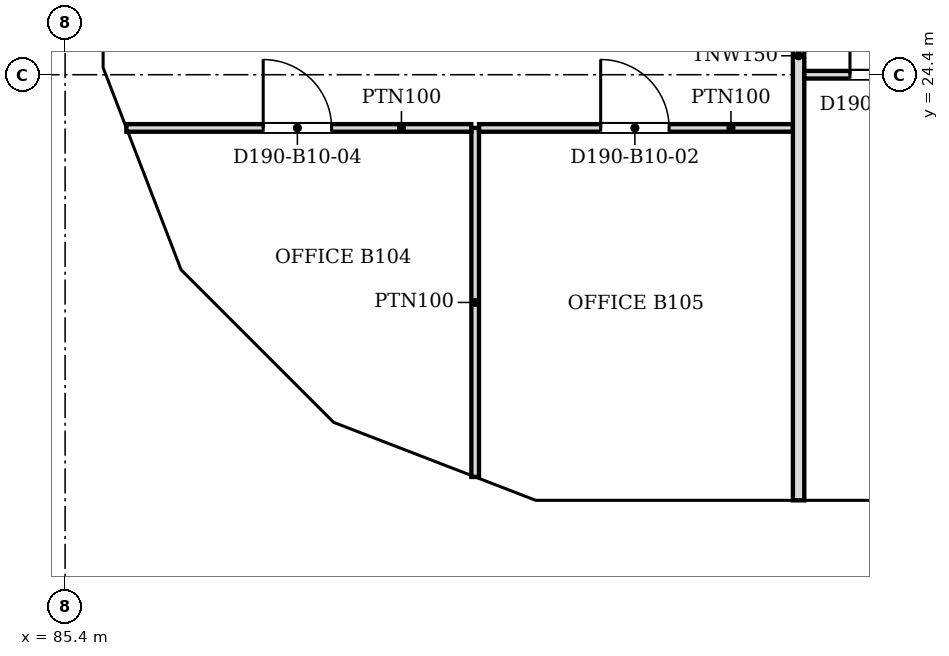
"""IFC4 building model, lengths in metres.
Left out: names, types, materials, properties, quantities, classifications, styles, units other than length and angle.
Written with IfcOpenShell. Run it as: python <this file> out.ifc"""

import sys

from ifc_helpers import new_model, si_unit, direction, frame, frame_2d, origin, place, context, subcontext, project, spatial, polyline, rectangle, outline, extrude, faceted_brep, source, transform, mapped, element, fill, save


model = new_model("IFC4")
c1 = context("Model", 3, precision=1e-05, world=origin(), true_north=direction((0.0, 1.0)))
c2 = subcontext(c1, "Body", "Model", "MODEL_VIEW")
j1 = project(units=[si_unit("LENGTHUNIT", "METRE"), si_unit("PLANEANGLEUNIT", "RADIAN")], contexts=[c1])
p1 = place(None, origin())
s1 = spatial("IfcSite", under=j1, at=p1, CompositionType="ELEMENT")
p2 = place(p1, origin())
s2 = spatial("IfcBuilding", under=s1, at=p2, CompositionType="ELEMENT")
p3 = place(p2, frame((0.0, 0.0, 102.8)))
s3 = spatial("IfcBuildingStorey", under=s2, at=p3, CompositionType="ELEMENT", Elevation=102.8)
m1 = source(origin(), c2, "Body", "Brep", [
    faceted_brep([(0.047, -0.25, 0.0), (3.05, -0.25, 3.8), (0.047, -0.25, 7.6), (0.0, -0.25, 7.54), (0.0, -0.25, 0.06), (0.093, 0.25, 7.541), (3.05, 0.25, 3.8), (0.093, 0.25, 0.059), (0.047, 0.0, 0.0), (0.047, 0.0, 7.6)], [[[0, 1, 2, 3, 4]], [[5, 6, 7]], [[7, 6, 1, 0, 8]], [[6, 5, 9, 2, 1]], [[3, 2, 9]], [[8, 0, 4]], [[7, 8, 4, 3, 9, 5]]]),
])
p4 = place(p3, frame((91.5, 18.55, -3.8), z_axis=(0.0, 0.0, 1.0), x_axis=(1.0, 0.0, 0.0)))
e1 = element("IfcWall", 1, at=p4, inside=s3, PredefinedType="SOLIDWALL", context=c2, shape_type="MappedRepresentation", body=[
    mapped(m1, transform((0.0, 0.0, 0.0), scale=1.0)),
])
m2 = source(origin(), c2, "Body", "SweptSolid", [
    extrude(outline(polyline([(0.247, 0.656), (2.731, 3.8), (0.247, 6.944), (0.247, 0.656)])), frame((0.0, 0.26, 0.0), z_axis=(0.0, -1.0, 0.0), x_axis=(1.0, 0.0, 0.0)), (0.0, 0.0, 1.0), 0.52),
])
p5 = place(p4, origin())
e2 = element("IfcOpeningElement", 2, at=p5, cuts=e1, PredefinedType="OPENING", context=c2, shape_type="MappedRepresentation", body=[
    mapped(m2, transform((0.0, 0.0, 0.0), scale=1.0)),
])
m3 = source(origin(), c2, "Body", "Brep", [
    faceted_brep([(2.95, -0.25, 0.0), (2.997, -0.25, 0.059), (2.997, -0.25, 7.541), (2.95, -0.25, 7.6), (0.0, -0.25, 3.8), (0.053, 0.25, 3.868), (2.904, 0.25, 7.54), (2.904, 0.25, 0.06), (0.053, 0.25, 3.732), (2.95, 0.0, 0.0), (2.95, 0.0, 7.6), (0.0, 0.0, 3.8)], [[[0, 1, 2, 3, 4]], [[5, 6, 7, 8]], [[1, 0, 9]], [[10, 3, 2]], [[6, 5, 11, 4, 3, 10]], [[8, 7, 9, 0, 4, 11]], [[8, 11, 5]], [[1, 9, 7, 6, 10, 2]]]),
])
p6 = place(p3, frame((88.794, 19.612, -3.8), z_axis=(0.0, 0.0, 1.0), x_axis=(0.933000876937, -0.359874094142, 0.0)))
e3 = element("IfcWall", 3, at=p6, inside=s3, PredefinedType="SOLIDWALL", context=c2, shape_type="MappedRepresentation", body=[
    mapped(m3, transform((0.0, 0.0, 0.0), scale=1.0)),
])
m4 = source(origin(), c2, "Body", "SweptSolid", [
    extrude(outline(polyline([(2.75, 6.935), (0.316, 3.8), (2.75, 0.665), (2.75, 6.935)])), frame((0.0, 0.26, 0.0), z_axis=(0.0, -1.0, 0.0), x_axis=(1.0, 0.0, 0.0)), (0.0, 0.0, 1.0), 0.52),
])
p7 = place(p6, origin())
e4 = element("IfcOpeningElement", 4, at=p7, cuts=e3, PredefinedType="OPENING", context=c2, shape_type="MappedRepresentation", body=[
    mapped(m4, transform((0.0, 0.0, 0.0), scale=1.0)),
])
m5 = source(origin(), c2, "Body", "Brep", [
    faceted_brep([(3.05, -0.25, 0.0), (6.1, -0.25, 3.8), (6.1, -0.25, 3.8), (3.05, -0.25, 7.6), (0.0, -0.25, 3.8), (0.0, 0.25, 3.8), (3.05, 0.25, 7.6), (6.1, 0.25, 3.8), (6.1, 0.25, 3.8), (3.05, 0.25, 0.0)], [[[0, 1, 2, 3, 4]], [[5, 6, 7, 8, 9]], [[9, 8, 1, 0]], [[7, 6, 3, 2]], [[6, 5, 4, 3]], [[5, 9, 0, 4]], [[1, 8, 7, 2]]]),
])
p8 = place(p3, frame((94.55, 18.55, -3.8), z_axis=(0.0, 0.0, 1.0), x_axis=(1.0, 0.0, 0.0)))
e5 = element("IfcWall", 5, at=p8, inside=s3, PredefinedType="SOLIDWALL", context=c2, shape_type="MappedRepresentation", body=[
    mapped(m5, transform((0.0, 0.0, 0.0), scale=1.0)),
])
m6 = source(origin(), c2, "Body", "SweptSolid", [
    extrude(outline(polyline([(3.05, 0.399), (5.78, 3.8), (3.05, 7.201), (0.321, 3.8), (3.05, 0.399)])), frame((0.0, 0.26, 0.0), z_axis=(0.0, -1.0, 0.0), x_axis=(1.0, 0.0, 0.0)), (0.0, 0.0, 1.0), 0.52),
])
p9 = place(p8, origin())
e6 = element("IfcOpeningElement", 6, at=p9, cuts=e5, PredefinedType="OPENING", context=c2, shape_type="MappedRepresentation", body=[
    mapped(m6, transform((0.0, 0.0, 0.0), scale=1.0)),
])
m7 = source(origin(), c2, "Body", "Brep", [
    faceted_brep([(3.05, -0.25, 0.0), (6.053, -0.25, 3.8), (3.05, -0.25, 7.6), (0.0, -0.25, 3.8), (0.0, 0.25, 3.8), (3.05, 0.25, 7.6), (6.007, 0.25, 3.859), (6.007, 0.25, 3.741), (3.05, 0.25, 0.0), (6.053, 0.0, 3.8)], [[[0, 1, 2, 3]], [[4, 5, 6, 7, 8]], [[8, 7, 9, 1, 0]], [[6, 5, 2, 1, 9]], [[5, 4, 3, 2]], [[4, 8, 0, 3]], [[9, 7, 6]]]),
])
p10 = place(p3, frame((85.65, 30.5, -3.8), z_axis=(0.0, 0.0, 1.0), x_axis=(0.0, -1.0, 0.0)))
e7 = element("IfcWall", 7, at=p10, inside=s3, PredefinedType="SOLIDWALL", context=c2, shape_type="MappedRepresentation", body=[
    mapped(m7, transform((0.0, 0.0, 0.0), scale=1.0)),
])
m8 = source(origin(), c2, "Body", "SweptSolid", [
    extrude(outline(polyline([(3.049, 0.401), (5.735, 3.8), (3.049, 7.199), (0.321, 3.8), (3.049, 0.401)])), frame((0.0, 0.26, 0.0), z_axis=(0.0, -1.0, 0.0), x_axis=(1.0, 0.0, 0.0)), (0.0, 0.0, 1.0), 0.52),
])
p11 = place(p10, origin())
e8 = element("IfcOpeningElement", 8, at=p11, cuts=e7, PredefinedType="OPENING", context=c2, shape_type="MappedRepresentation", body=[
    mapped(m8, transform((0.0, 0.0, 0.0), scale=1.0)),
])
m9 = source(origin(), c2, "Body", "Brep", [
    faceted_brep([(2.95, -0.25, 0.0), (3.003, -0.25, 0.068), (3.003, -0.25, 7.532), (2.95, -0.25, 7.6), (0.0, -0.25, 3.8), (0.047, 0.25, 3.86), (2.898, 0.25, 7.532), (2.898, 0.25, 0.068), (0.047, 0.25, 3.74), (2.95, 0.0, 0.0), (2.95, 0.0, 7.6), (0.0, 0.0, 3.8)], [[[0, 1, 2, 3, 4]], [[5, 6, 7, 8]], [[1, 0, 9]], [[10, 3, 2]], [[6, 5, 11, 4, 3, 10]], [[8, 7, 9, 0, 4, 11]], [[8, 11, 5]], [[1, 9, 7, 6, 10, 2]]]),
])
p12 = place(p3, frame((85.65, 24.447, -3.8), z_axis=(0.0, 0.0, 1.0), x_axis=(0.35992665181, -0.932980602862, 0.0)))
e9 = element("IfcWall", 9, at=p12, inside=s3, PredefinedType="SOLIDWALL", context=c2, shape_type="MappedRepresentation", body=[
    mapped(m9, transform((0.0, 0.0, 0.0), scale=1.0)),
])
p13 = place(p12, origin())
e10 = element("IfcOpeningElement", 10, at=p13, cuts=e9, PredefinedType="OPENING", context=c2, shape_type="MappedRepresentation", body=[
    mapped(m4, transform((0.0, 0.0, 0.0), scale=1.0)),
])
m10 = source(origin(), c2, "Body", "Brep", [
    faceted_brep([(0.053, -0.25, 0.0), (2.997, -0.25, 3.8), (0.053, -0.25, 7.6), (0.0, -0.25, 7.532), (0.0, -0.25, 0.068), (0.106, 0.25, 7.532), (2.944, 0.25, 3.868), (2.944, 0.25, 3.732), (0.106, 0.25, 0.068), (2.997, 0.0, 3.8), (0.053, 0.0, 0.0), (0.053, 0.0, 7.6)], [[[0, 1, 2, 3, 4]], [[5, 6, 7, 8]], [[8, 7, 9, 1, 0, 10]], [[6, 5, 11, 2, 1, 9]], [[3, 2, 11]], [[10, 0, 4]], [[8, 10, 4, 3, 11, 5]], [[9, 7, 6]]]),
])
p14 = place(p3, frame((86.675, 21.731, -3.8), z_axis=(0.0, 0.0, 1.0), x_axis=(0.707106781187, -0.707106781187, 0.0)))
e11 = element("IfcWall", 11, at=p14, inside=s3, PredefinedType="SOLIDWALL", context=c2, shape_type="MappedRepresentation", body=[
    mapped(m10, transform((0.0, 0.0, 0.0), scale=1.0)),
])
m11 = source(origin(), c2, "Body", "SweptSolid", [
    extrude(outline(polyline([(0.253, 0.666), (2.681, 3.8), (0.253, 6.934), (0.253, 0.666)])), frame((0.0, 0.26, 0.0), z_axis=(0.0, -1.0, 0.0), x_axis=(1.0, 0.0, 0.0)), (0.0, 0.0, 1.0), 0.52),
])
p15 = place(p14, origin())
e12 = element("IfcOpeningElement", 12, at=p15, cuts=e11, PredefinedType="OPENING", context=c2, shape_type="MappedRepresentation", body=[
    mapped(m11, transform((0.0, 0.0, 0.0), scale=1.0)),
])
m12 = source(origin(), c2, "Body", "Brep", [
    faceted_brep([(3.003, -0.25, 0.0), (6.053, -0.25, 3.8), (0.0, -0.25, 3.8), (0.047, 0.25, 3.8), (6.053, 0.25, 3.8), (3.003, 0.25, 0.0), (0.047, 0.25, 3.741), (0.0, 0.0, 3.8)], [[[0, 1, 2]], [[3, 4, 5, 6]], [[5, 4, 1, 0]], [[4, 3, 7, 2, 1]], [[6, 5, 0, 2, 7]], [[6, 7, 3]]]),
])
p16 = place(p3, frame((91.547, 18.55, 0.0), z_axis=(0.0, 0.0, 1.0), x_axis=(1.0, 0.0, 0.0)))
e13 = element("IfcWall", 13, at=p16, inside=s3, PredefinedType="SOLIDWALL", context=c2, shape_type="MappedRepresentation", body=[
    mapped(m12, transform((0.0, 0.0, 0.0), scale=1.0)),
])
m13 = source(origin(), c2, "Body", "SweptSolid", [
    extrude(outline(polyline([(3.005, 0.401), (5.532, 3.55), (0.516, 3.55), (3.005, 0.401)])), frame((0.0, 0.26, 0.0), z_axis=(0.0, -1.0, 0.0), x_axis=(1.0, 0.0, 0.0)), (0.0, 0.0, 1.0), 0.52),
])
p17 = place(p16, origin())
e14 = element("IfcOpeningElement", 14, at=p17, cuts=e13, PredefinedType="OPENING", context=c2, shape_type="MappedRepresentation", body=[
    mapped(m13, transform((0.0, 0.0, 0.0), scale=1.0)),
])
m14 = source(origin(), c2, "Body", "Brep", [
    faceted_brep([(3.003, -0.25, 0.0), (3.05, -0.25, 0.06), (3.05, -0.25, 3.8), (0.0, -0.25, 3.8), (0.0, 0.25, 3.8), (2.957, 0.25, 3.8), (2.957, 0.25, 0.059), (3.003, 0.0, 0.0)], [[[0, 1, 2, 3]], [[4, 5, 6]], [[1, 0, 7]], [[5, 4, 3, 2]], [[4, 6, 7, 0, 3]], [[1, 7, 6, 5, 2]]]),
])
p18 = place(p3, frame((85.65, 27.45, 0.0), z_axis=(0.0, 0.0, 1.0), x_axis=(0.0, -1.0, 0.0)))
e15 = element("IfcWall", 15, at=p18, inside=s3, PredefinedType="SOLIDWALL", context=c2, shape_type="MappedRepresentation", body=[
    mapped(m14, transform((0.0, 0.0, 0.0), scale=1.0)),
])
m15 = source(origin(), c2, "Body", "SweptSolid", [
    extrude(outline(polyline([(2.803, 3.55), (0.516, 3.55), (2.803, 0.656), (2.803, 3.55)])), frame((0.0, 0.26, 0.0), z_axis=(0.0, -1.0, 0.0), x_axis=(1.0, 0.0, 0.0)), (0.0, 0.0, 1.0), 0.52),
])
p19 = place(p18, origin())
e16 = element("IfcOpeningElement", 16, at=p19, cuts=e15, PredefinedType="OPENING", context=c2, shape_type="MappedRepresentation", body=[
    mapped(m15, transform((0.0, 0.0, 0.0), scale=1.0)),
])
m16 = source(origin(), c2, "Body", "Brep", [
    faceted_brep([(0.047, -0.25, 0.0), (2.997, -0.25, 3.8), (0.0, -0.25, 3.8), (0.0, -0.25, 0.059), (0.093, 0.25, 3.8), (2.944, 0.25, 3.8), (2.944, 0.25, 3.732), (0.093, 0.25, 0.06), (2.997, 0.0, 3.8), (0.047, 0.0, 0.0)], [[[0, 1, 2, 3]], [[4, 5, 6, 7]], [[7, 6, 8, 1, 0, 9]], [[5, 4, 2, 1, 8]], [[9, 0, 3]], [[7, 9, 3, 2, 4]], [[6, 5, 8]]]),
])
p20 = place(p3, frame((85.633, 24.49, 0.0), z_axis=(0.0, 0.0, 1.0), x_axis=(0.359901446078, -0.932990326376, 0.0)))
e17 = element("IfcWall", 17, at=p20, inside=s3, PredefinedType="SOLIDWALL", context=c2, shape_type="MappedRepresentation", body=[
    mapped(m16, transform((0.0, 0.0, 0.0), scale=1.0)),
])
m17 = source(origin(), c2, "Body", "SweptSolid", [
    extrude(outline(polyline([(0.247, 0.665), (2.487, 3.55), (0.247, 3.55), (0.247, 0.665)])), frame((0.0, 0.26, 0.0), z_axis=(0.0, -1.0, 0.0), x_axis=(1.0, 0.0, 0.0)), (0.0, 0.0, 1.0), 0.52),
])
p21 = place(p20, origin())
e18 = element("IfcOpeningElement", 18, at=p21, cuts=e17, PredefinedType="OPENING", context=c2, shape_type="MappedRepresentation", body=[
    mapped(m17, transform((0.0, 0.0, 0.0), scale=1.0)),
])
m18 = source(origin(), c2, "Body", "Brep", [
    faceted_brep([(2.944, -0.25, 0.0), (2.997, -0.25, 0.068), (2.997, -0.25, 3.8), (0.0, -0.25, 3.8), (0.053, 0.25, 3.8), (2.891, 0.25, 3.8), (2.891, 0.25, 0.068), (0.053, 0.25, 3.732), (2.944, 0.0, 0.0), (0.0, 0.0, 3.8)], [[[0, 1, 2, 3]], [[4, 5, 6, 7]], [[1, 0, 8]], [[5, 4, 9, 3, 2]], [[7, 6, 8, 0, 3, 9]], [[7, 9, 4]], [[1, 8, 6, 5, 2]]]),
])
p22 = place(p3, frame((86.712, 21.694, 0.0), z_axis=(0.0, 0.0, 1.0), x_axis=(0.707066050402, -0.707147509625, 0.0)))
e19 = element("IfcWall", 19, at=p22, inside=s3, PredefinedType="SOLIDWALL", context=c2, shape_type="MappedRepresentation", body=[
    mapped(m18, transform((0.0, 0.0, 0.0), scale=1.0)),
])
m19 = source(origin(), c2, "Body", "SweptSolid", [
    extrude(outline(polyline([(2.744, 3.55), (0.51, 3.55), (2.744, 0.666), (2.744, 3.55)])), frame((0.0, 0.26, 0.0), z_axis=(0.0, -1.0, 0.0), x_axis=(1.0, 0.0, 0.0)), (0.0, 0.0, 1.0), 0.52),
])
p23 = place(p22, origin())
e20 = element("IfcOpeningElement", 20, at=p23, cuts=e19, PredefinedType="OPENING", context=c2, shape_type="MappedRepresentation", body=[
    mapped(m19, transform((0.0, 0.0, 0.0), scale=1.0)),
])
m20 = source(origin(), c2, "Body", "Brep", [
    faceted_brep([(0.053, -0.25, 0.0), (3.003, -0.25, 3.8), (0.0, -0.25, 3.8), (0.0, -0.25, 0.068), (0.106, 0.25, 3.8), (2.957, 0.25, 3.8), (2.957, 0.25, 3.74), (0.106, 0.25, 0.068), (3.003, 0.0, 3.8), (0.053, 0.0, 0.0)], [[[0, 1, 2, 3]], [[4, 5, 6, 7]], [[7, 6, 8, 1, 0, 9]], [[5, 4, 2, 1, 8]], [[9, 0, 3]], [[7, 9, 3, 2, 4]], [[6, 5, 8]]]),
])
p24 = place(p3, frame((88.744, 19.631, 0.0), z_axis=(0.0, 0.0, 1.0), x_axis=(0.932997369089, -0.359883188373, 0.0)))
e21 = element("IfcWall", 21, at=p24, inside=s3, PredefinedType="SOLIDWALL", context=c2, shape_type="MappedRepresentation", body=[
    mapped(m20, transform((0.0, 0.0, 0.0), scale=1.0)),
])
m21 = source(origin(), c2, "Body", "SweptSolid", [
    extrude(outline(polyline([(0.253, 0.665), (2.493, 3.55), (0.253, 3.55), (0.253, 0.665)])), frame((0.0, 0.26, 0.0), z_axis=(0.0, -1.0, 0.0), x_axis=(1.0, 0.0, 0.0)), (0.0, 0.0, 1.0), 0.52),
])
p25 = place(p24, origin())
e22 = element("IfcOpeningElement", 22, at=p25, cuts=e21, PredefinedType="OPENING", context=c2, shape_type="MappedRepresentation", body=[
    mapped(m21, transform((0.0, 0.0, 0.0), scale=1.0)),
])
p26 = place(p3, frame((95.05, 18.8, 0.0), z_axis=(0.0, 0.0, 1.0), x_axis=(0.0, 1.0, 0.0)))
e23 = element("IfcWall", 23, at=p26, inside=s3, PredefinedType="PARTITIONING", context=c2, shape_type="SweptSolid", body=[
    extrude(rectangle(XDim=11.699, YDim=0.15, at=frame_2d((5.85, 0.0))), origin(), (0.0, 0.0, 1.0), 2.715),
])
p27 = place(p3, frame((90.795, 19.108, 0.0), z_axis=(0.0, 0.0, 1.0), x_axis=(0.0, 1.0, 0.0)))
e24 = element("IfcWall", 24, at=p27, inside=s3, PredefinedType="PARTITIONING", context=c2, shape_type="SweptSolid", body=[
    extrude(rectangle(XDim=4.592, YDim=0.1, at=frame_2d((2.296, 0.0))), origin(), (0.0, 0.0, 1.0), 2.715),
])
p28 = place(p3, frame((90.744, 23.7, 0.0), z_axis=(0.0, 0.0, 1.0), x_axis=(-1.0, 0.0, 0.0)))
e25 = element("IfcWall", 25, at=p28, inside=s3, PredefinedType="PARTITIONING", context=c2, shape_type="SweptSolid", body=[
    extrude(rectangle(XDim=4.538, YDim=0.1, at=frame_2d((2.269, 0.0))), origin(), (0.0, 0.0, 1.0), 2.715),
])
m22 = source(origin(), c2, "Body", "SweptSolid", [
    extrude(rectangle(XDim=0.9, YDim=2.1, at=frame_2d((0.45, 1.05))), frame((0.0, 0.06, 0.0), z_axis=(0.0, -1.0, 0.0), x_axis=(1.0, 0.0, 0.0)), (0.0, 0.0, 1.0), 0.12),
])
p29 = place(p28, frame((1.838, 0.0, 0.0)))
e26 = element("IfcOpeningElement", 26, at=p29, cuts=e25, PredefinedType="OPENING", context=c2, shape_type="MappedRepresentation", body=[
    mapped(m22, transform((0.0, 0.0, 0.0), scale=1.0)),
])
p30 = place(p3, frame((94.974, 23.7, 0.0), z_axis=(0.0, 0.0, 1.0), x_axis=(-1.0, 0.0, 0.0)))
e27 = element("IfcWall", 27, at=p30, inside=s3, PredefinedType="PARTITIONING", context=c2, shape_type="SweptSolid", body=[
    extrude(rectangle(XDim=4.128, YDim=0.1, at=frame_2d((2.064, 0.0))), origin(), (0.0, 0.0, 1.0), 2.715),
])
p31 = place(p30, frame((1.628, 0.0, 0.0)))
e28 = element("IfcOpeningElement", 28, at=p31, cuts=e27, PredefinedType="OPENING", context=c2, shape_type="MappedRepresentation", body=[
    mapped(m22, transform((0.0, 0.0, 0.0), scale=1.0)),
])
p32 = place(p3, frame((97.249, 24.4, 0.0), z_axis=(0.0, 0.0, 1.0), x_axis=(-1.0, 0.0, 0.0)))
e29 = element("IfcWall", 29, at=p32, inside=s3, PredefinedType="PARTITIONING", context=c2, shape_type="SweptSolid", body=[
    extrude(rectangle(XDim=2.123, YDim=0.1, at=frame_2d((1.062, 0.0))), origin(), (0.0, 0.0, 1.0), 2.715),
])
p33 = place(p32, frame((0.623, 0.0, 0.0)))
e30 = element("IfcOpeningElement", 30, at=p33, cuts=e29, PredefinedType="OPENING", context=c2, shape_type="MappedRepresentation", body=[
    mapped(m22, transform((0.0, 0.0, 0.0), scale=1.0)),
])
m23 = source(origin(), c2, "Body", "SweptSolid", [
    extrude(rectangle(XDim=0.9, YDim=2.1, at=frame_2d((0.45, 1.05))), frame((0.0, 0.025, 0.0), z_axis=(0.0, -1.0, 0.0), x_axis=(1.0, 0.0, 0.0)), (0.0, 0.0, 1.0), 0.05),
])
p34 = place(p33, origin())
e31 = element("IfcDoor", 31, at=p34, inside=s3, OperationType="SINGLE_SWING_RIGHT", PredefinedType="DOOR", context=c2, shape_type="MappedRepresentation", body=[
    mapped(m23, transform((0.0, 0.0, 0.0), scale=1.0)),
])
fill(e30, e31)
p35 = place(p31, origin())
e32 = element("IfcDoor", 32, at=p35, inside=s3, OperationType="SINGLE_SWING_RIGHT", PredefinedType="DOOR", context=c2, shape_type="MappedRepresentation", body=[
    mapped(m23, transform((0.0, 0.0, 0.0), scale=1.0)),
])
fill(e28, e32)
p36 = place(p29, origin())
e33 = element("IfcDoor", 33, at=p36, inside=s3, OperationType="SINGLE_SWING_RIGHT", PredefinedType="DOOR", context=c2, shape_type="MappedRepresentation", body=[
    mapped(m23, transform((0.0, 0.0, 0.0), scale=1.0)),
])
fill(e26, e33)
save(model, sys.argv[1])
